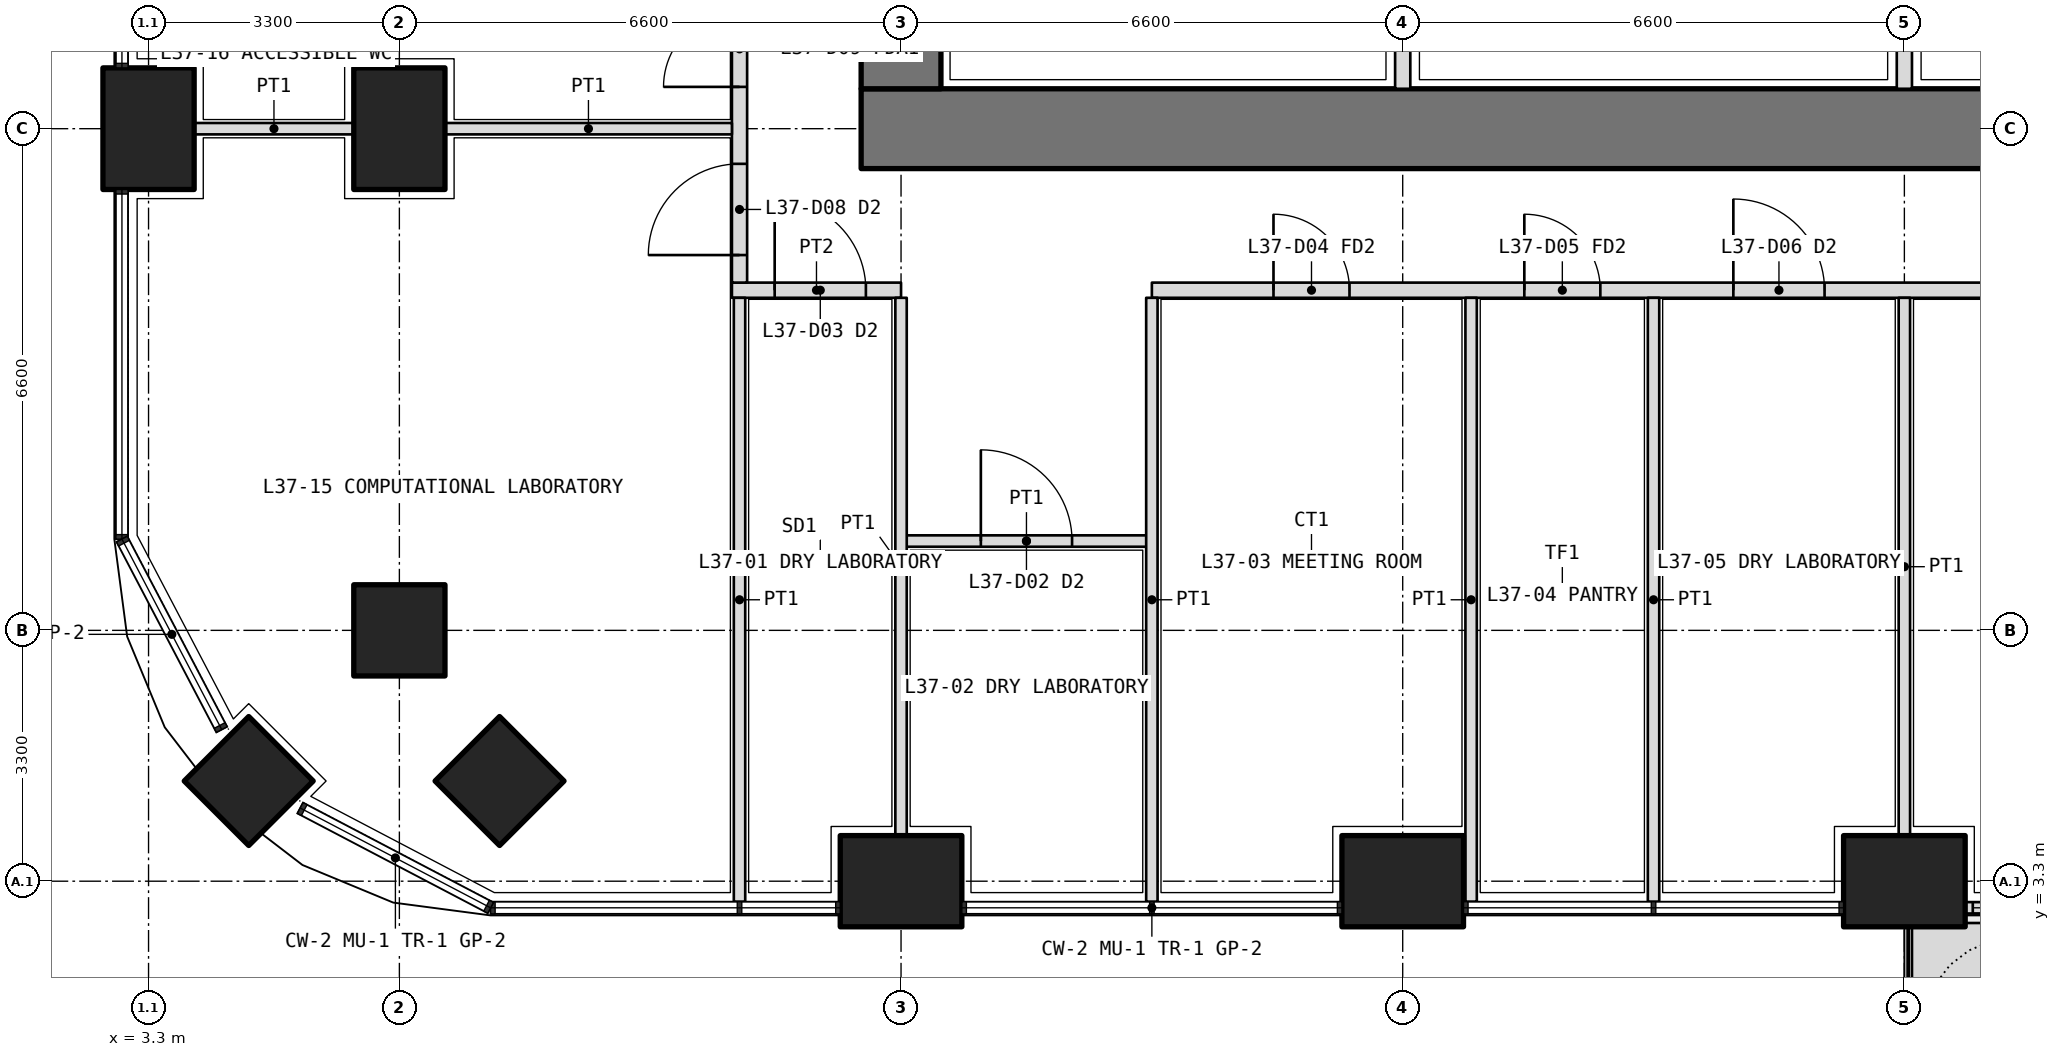
"""IFC4 building model, lengths in metres.
Left out: names, types, materials, properties, quantities, classifications, styles, units other than length and angle.
Written with IfcOpenShell. Run it as: python <this file> out.ifc"""

import sys

from ifc_helpers import new_model, si_unit, direction, frame, frame_2d, origin, origin_2d, place, context, subcontext, project, spatial, polyline, rectangle, outline, extrude, element, fill, save


model = new_model("IFC4")
c1 = context("Model", 3, precision=1e-05, world=origin(), true_north=direction((0.0, 1.0)))
c2 = subcontext(c1, "Body", "Model", "MODEL_VIEW")
j1 = project(units=[si_unit("LENGTHUNIT", "METRE"), si_unit("PLANEANGLEUNIT", "RADIAN")], contexts=[c1])
p1 = place(None, origin())
s1 = spatial("IfcSite", under=j1, at=p1, CompositionType="ELEMENT")
p2 = place(p1, origin())
s2 = spatial("IfcBuilding", under=s1, at=p2, CompositionType="ELEMENT")
p3 = place(p2, frame((0.0, 0.0, 164.1)))
s3 = spatial("IfcBuildingStorey", under=s2, at=p3, CompositionType="ELEMENT", Elevation=164.1)
p4 = place(p3, frame((4.618, 4.618, 0.0), z_axis=(0.0, 0.0, 1.0), x_axis=(0.707106781187, 0.707106781187, 0.0)))
e1 = element("IfcColumn", 1, at=p4, inside=s3, PredefinedType="COLUMN", context=c2, shape_type="SweptSolid", body=[
    extrude(rectangle(XDim=1.2, YDim=1.2, at=origin_2d()), origin(), (0.0, 0.0, 1.0), 4.2),
])
for number, where, z_axis, x_axis in (
    (2, (13.2, 3.3, 0.0), (0.0, 0.0, 1.0), (1.0, 0.0, 0.0)),
    (3, (19.8, 3.3, 0.0), (0.0, 0.0, 1.0), (1.0, 0.0, 0.0)),
    (4, (26.4, 3.3, 0.0), (0.0, 0.0, 1.0), (1.0, 0.0, 0.0)),
    (5, (3.3, 13.2, 0.0), (0.0, 0.0, 1.0), (0.0, 1.0, 0.0)),
):
    element("IfcColumn", number, at=place(p3, frame(where, z_axis=z_axis, x_axis=x_axis)), inside=s3, PredefinedType="COLUMN", context=c2, shape_type="SweptSolid", body=[
        extrude(rectangle(XDim=1.6, YDim=1.2, at=origin_2d()), origin(), (0.0, 0.0, 1.0), 4.2),
    ])
for number, where, z_axis, x_axis in (
    (6, (6.6, 6.6, 0.0), (0.0, 0.0, 1.0), (1.0, 0.0, 0.0)),
    (7, (7.918, 4.618, 0.0), (0.0, 0.0, 1.0), (0.707, 0.707, 0.0)),
):
    element("IfcColumn", number, at=place(p3, frame(where, z_axis=z_axis, x_axis=x_axis)), inside=s3, PredefinedType="COLUMN", context=c2, shape_type="SweptSolid", body=[
        extrude(rectangle(XDim=1.2, YDim=1.2, at=origin_2d()), origin(), (0.0, 0.0, 1.0), 4.2),
    ])
p5 = place(p3, frame((6.6, 13.2, 0.0), z_axis=(0.0, 0.0, 1.0), x_axis=(0.0, 1.0, 0.0)))
e8 = element("IfcColumn", 8, at=p5, inside=s3, PredefinedType="COLUMN", context=c2, shape_type="SweptSolid", body=[
    extrude(rectangle(XDim=1.6, YDim=1.2, at=origin_2d()), origin(), (0.0, 0.0, 1.0), 4.2),
])
p6 = place(p3, origin())
e9 = element("IfcWall", 9, at=p6, inside=s3, PredefinedType="USERDEFINED", context=c2, shape_type="SweptSolid", body=[
    extrude(outline(polyline([(26.5, 1.75), (28.95, 1.75), (28.95, 2.75), (26.5, 2.75), (26.5, 1.75)]), holes=[polyline([(26.65, 1.9), (28.8, 1.9), (28.8, 2.6), (26.65, 2.6), (26.65, 1.9)])]), origin(), (0.0, 0.0, 1.0), 1.05),
])
p7 = place(p3, frame((27.2, 2.95, 0.0), z_axis=(0.0, 0.0, 1.0), x_axis=(1.0, 0.0, 0.0)))
e10 = element("IfcWall", 10, at=p7, inside=s3, PredefinedType="SOLIDWALL", context=c2, shape_type="SweptSolid", body=[
    extrude(rectangle(XDim=5.0, YDim=0.15, at=frame_2d((2.5, 0.0))), origin(), (0.0, 0.0, 1.0), 2.7),
])
p8 = place(p7, frame((2.75, 0.0, 0.0)))
e11 = element("IfcOpeningElement", 11, at=p8, cuts=e10, PredefinedType="OPENING", context=c2, shape_type="SweptSolid", body=[
    extrude(rectangle(XDim=1.0, YDim=2.4, at=frame_2d((0.5, 1.2))), frame((0.0, 0.085, 0.0), z_axis=(0.0, -1.0, 0.0), x_axis=(1.0, 0.0, 0.0)), (0.0, 0.0, 1.0), 0.17),
])
p9 = place(p7, frame((0.1, 0.0, 0.1)))
e12 = element("IfcOpeningElement", 12, at=p9, cuts=e10, PredefinedType="OPENING", context=c2, shape_type="SweptSolid", body=[
    extrude(rectangle(XDim=2.15, YDim=2.3, at=frame_2d((1.075, 1.15))), frame((0.0, 0.085, 0.0), z_axis=(0.0, -1.0, 0.0), x_axis=(1.0, 0.0, 0.0)), (0.0, 0.0, 1.0), 0.17),
])
p10 = place(p7, frame((3.85, 0.0, 0.1)))
e13 = element("IfcOpeningElement", 13, at=p10, cuts=e10, PredefinedType="OPENING", context=c2, shape_type="SweptSolid", body=[
    extrude(rectangle(XDim=1.05, YDim=2.3, at=frame_2d((0.525, 1.15))), frame((0.0, 0.085, 0.0), z_axis=(0.0, -1.0, 0.0), x_axis=(1.0, 0.0, 0.0)), (0.0, 0.0, 1.0), 0.17),
])
p11 = place(p3, frame((12.675, 13.2, 0.0), z_axis=(0.0, 0.0, 1.0), x_axis=(1.0, 0.0, 0.0)))
e14 = element("IfcWall", 14, at=p11, inside=s3, PredefinedType="SHEAR", context=c2, shape_type="SweptSolid", body=[
    extrude(rectangle(XDim=27.45, YDim=1.05, at=frame_2d((13.725, 0.0))), origin(), (0.0, 0.0, 1.0), 4.2),
])
p12 = place(p3, frame((13.2, 32.475, 0.0), z_axis=(0.0, 0.0, 1.0), x_axis=(0.0, -1.0, 0.0)))
e15 = element("IfcWall", 15, at=p12, inside=s3, PredefinedType="SHEAR", context=c2, shape_type="SweptSolid", body=[
    extrude(rectangle(XDim=18.75, YDim=1.05, at=frame_2d((9.375, 0.0))), origin(), (0.0, 0.0, 1.0), 4.2),
])
p13 = place(p12, frame((14.125, 0.0, 0.0)))
e16 = element("IfcOpeningElement", 16, at=p13, cuts=e15, PredefinedType="OPENING", context=c2, shape_type="SweptSolid", body=[
    extrude(rectangle(XDim=1.6, YDim=2.1, at=frame_2d((0.8, 1.05))), frame((0.0, 0.535, 0.0), z_axis=(0.0, -1.0, 0.0), x_axis=(1.0, 0.0, 0.0)), (0.0, 0.0, 1.0), 1.07),
])
p14 = place(p12, frame((3.325, 0.0, 0.0)))
e17 = element("IfcOpeningElement", 17, at=p14, cuts=e15, PredefinedType="OPENING", context=c2, shape_type="SweptSolid", body=[
    extrude(rectangle(XDim=1.6, YDim=2.1, at=frame_2d((0.8, 1.05))), frame((0.0, 0.535, 0.0), z_axis=(0.0, -1.0, 0.0), x_axis=(1.0, 0.0, 0.0)), (0.0, 0.0, 1.0), 1.07),
])
for number, where, z_axis, x_axis in (
    (18, (19.8, 13.725, 0.0), (0.0, 0.0, 1.0), (0.0, 1.0, 0.0)),
    (19, (26.4, 13.725, 0.0), (0.0, 0.0, 1.0), (0.0, 1.0, 0.0)),
):
    element("IfcWall", number, at=place(p3, frame(where, z_axis=z_axis, x_axis=x_axis)), inside=s3, PredefinedType="PARTITIONING", context=c2, shape_type="SweptSolid", body=[
        extrude(rectangle(XDim=1.975, YDim=0.2, at=frame_2d((0.987, 0.0))), origin(), (0.0, 0.0, 1.0), 4.2),
    ])
p15 = place(p3, frame((10.975, 11.075, 0.0), z_axis=(0.0, 0.0, 1.0), x_axis=(1.0, 0.0, 0.0)))
e20 = element("IfcWall", 20, at=p15, inside=s3, PredefinedType="PARTITIONING", context=c2, shape_type="SweptSolid", body=[
    extrude(rectangle(XDim=2.225, YDim=0.2, at=frame_2d((1.112, 0.0))), origin(), (0.0, 0.0, 1.0), 2.85),
])
p16 = place(p15, frame((0.562, 0.0, 0.0)))
e21 = element("IfcOpeningElement", 21, at=p16, cuts=e20, PredefinedType="OPENING", context=c2, shape_type="SweptSolid", body=[
    extrude(rectangle(XDim=1.2, YDim=2.1, at=frame_2d((0.6, 1.05))), frame((0.0, 0.11, 0.0), z_axis=(0.0, -1.0, 0.0), x_axis=(1.0, 0.0, 0.0)), (0.0, 0.0, 1.0), 0.22),
])
p17 = place(p3, frame((16.5, 11.075, 0.0), z_axis=(0.0, 0.0, 1.0), x_axis=(1.0, 0.0, 0.0)))
e22 = element("IfcWall", 22, at=p17, inside=s3, PredefinedType="PARTITIONING", context=c2, shape_type="SweptSolid", body=[
    extrude(rectangle(XDim=25.325, YDim=0.2, at=frame_2d((12.663, 0.0))), origin(), (0.0, 0.0, 1.0), 2.85),
])
p18 = place(p17, frame((1.6, 0.0, 0.0)))
e23 = element("IfcOpeningElement", 23, at=p18, cuts=e22, PredefinedType="OPENING", context=c2, shape_type="SweptSolid", body=[
    extrude(rectangle(XDim=1.0, YDim=2.1, at=frame_2d((0.5, 1.05))), frame((0.0, 0.11, 0.0), z_axis=(0.0, -1.0, 0.0), x_axis=(1.0, 0.0, 0.0)), (0.0, 0.0, 1.0), 0.22),
])
p19 = place(p17, frame((4.9, 0.0, 0.0)))
e24 = element("IfcOpeningElement", 24, at=p19, cuts=e22, PredefinedType="OPENING", context=c2, shape_type="SweptSolid", body=[
    extrude(rectangle(XDim=1.0, YDim=2.1, at=frame_2d((0.5, 1.05))), frame((0.0, 0.11, 0.0), z_axis=(0.0, -1.0, 0.0), x_axis=(1.0, 0.0, 0.0)), (0.0, 0.0, 1.0), 0.22),
])
p20 = place(p17, frame((7.65, 0.0, 0.0)))
e25 = element("IfcOpeningElement", 25, at=p20, cuts=e22, PredefinedType="OPENING", context=c2, shape_type="SweptSolid", body=[
    extrude(rectangle(XDim=1.2, YDim=2.1, at=frame_2d((0.6, 1.05))), frame((0.0, 0.11, 0.0), z_axis=(0.0, -1.0, 0.0), x_axis=(1.0, 0.0, 0.0)), (0.0, 0.0, 1.0), 0.22),
])
p21 = place(p17, frame((16.962, 0.0, 0.0)))
e26 = element("IfcOpeningElement", 26, at=p21, cuts=e22, PredefinedType="OPENING", context=c2, shape_type="SweptSolid", body=[
    extrude(rectangle(XDim=1.2, YDim=2.1, at=frame_2d((0.6, 1.05))), frame((0.0, 0.11, 0.0), z_axis=(0.0, -1.0, 0.0), x_axis=(1.0, 0.0, 0.0)), (0.0, 0.0, 1.0), 0.22),
])
p22 = place(p3, frame((11.075, 11.175, 0.0), z_axis=(0.0, 0.0, 1.0), x_axis=(0.0, 1.0, 0.0)))
e27 = element("IfcWall", 27, at=p22, inside=s3, PredefinedType="PARTITIONING", context=c2, shape_type="SweptSolid", body=[
    extrude(rectangle(XDim=23.85, YDim=0.2, at=frame_2d((11.925, 0.0))), origin(), (0.0, 0.0, 1.0), 2.85),
])
p23 = place(p22, frame((0.363, 0.0, 0.0)))
e28 = element("IfcOpeningElement", 28, at=p23, cuts=e27, PredefinedType="OPENING", context=c2, shape_type="SweptSolid", body=[
    extrude(rectangle(XDim=1.2, YDim=2.1, at=frame_2d((0.6, 1.05))), frame((0.0, 0.11, 0.0), z_axis=(0.0, -1.0, 0.0), x_axis=(1.0, 0.0, 0.0)), (0.0, 0.0, 1.0), 0.22),
])
p24 = place(p22, frame((2.575, 0.0, 0.0)))
e29 = element("IfcOpeningElement", 29, at=p24, cuts=e27, PredefinedType="OPENING", context=c2, shape_type="SweptSolid", body=[
    extrude(rectangle(XDim=1.0, YDim=2.1, at=frame_2d((0.5, 1.05))), frame((0.0, 0.11, 0.0), z_axis=(0.0, -1.0, 0.0), x_axis=(1.0, 0.0, 0.0)), (0.0, 0.0, 1.0), 0.22),
])
p25 = place(p22, frame((5.625, 0.0, 0.0)))
e30 = element("IfcOpeningElement", 30, at=p25, cuts=e27, PredefinedType="OPENING", context=c2, shape_type="SweptSolid", body=[
    extrude(rectangle(XDim=0.9, YDim=2.1, at=frame_2d((0.45, 1.05))), frame((0.0, 0.11, 0.0), z_axis=(0.0, -1.0, 0.0), x_axis=(1.0, 0.0, 0.0)), (0.0, 0.0, 1.0), 0.22),
])
p26 = place(p22, frame((9.425, 0.0, 0.0)))
e31 = element("IfcOpeningElement", 31, at=p26, cuts=e27, PredefinedType="OPENING", context=c2, shape_type="SweptSolid", body=[
    extrude(rectangle(XDim=0.9, YDim=2.1, at=frame_2d((0.45, 1.05))), frame((0.0, 0.11, 0.0), z_axis=(0.0, -1.0, 0.0), x_axis=(1.0, 0.0, 0.0)), (0.0, 0.0, 1.0), 0.22),
])
p27 = place(p22, frame((12.975, 0.0, 0.0)))
e32 = element("IfcOpeningElement", 32, at=p27, cuts=e27, PredefinedType="OPENING", context=c2, shape_type="SweptSolid", body=[
    extrude(rectangle(XDim=1.0, YDim=2.1, at=frame_2d((0.5, 1.05))), frame((0.0, 0.11, 0.0), z_axis=(0.0, -1.0, 0.0), x_axis=(1.0, 0.0, 0.0)), (0.0, 0.0, 1.0), 0.22),
])
p28 = place(p22, frame((16.375, 0.0, 0.0)))
e33 = element("IfcOpeningElement", 33, at=p28, cuts=e27, PredefinedType="OPENING", context=c2, shape_type="SweptSolid", body=[
    extrude(rectangle(XDim=1.0, YDim=2.1, at=frame_2d((0.5, 1.05))), frame((0.0, 0.11, 0.0), z_axis=(0.0, -1.0, 0.0), x_axis=(1.0, 0.0, 0.0)), (0.0, 0.0, 1.0), 0.22),
])
p29 = place(p22, frame((20.637, 0.0, 0.0)))
e34 = element("IfcOpeningElement", 34, at=p29, cuts=e27, PredefinedType="OPENING", context=c2, shape_type="SweptSolid", body=[
    extrude(rectangle(XDim=1.2, YDim=2.1, at=frame_2d((0.6, 1.05))), frame((0.0, 0.11, 0.0), z_axis=(0.0, -1.0, 0.0), x_axis=(1.0, 0.0, 0.0)), (0.0, 0.0, 1.0), 0.22),
])
p30 = place(p3, frame((11.075, 3.03, 0.0), z_axis=(0.0, 0.0, 1.0), x_axis=(0.0, 1.0, 0.0)))
e35 = element("IfcWall", 35, at=p30, inside=s3, PredefinedType="PARTITIONING", context=c2, shape_type="SweptSolid", body=[
    extrude(rectangle(XDim=7.945, YDim=0.15, at=frame_2d((3.973, 0.0))), origin(), (0.0, 0.0, 1.0), 2.7),
])
p31 = place(p3, frame((13.2, 7.775, 0.0), z_axis=(0.0, 0.0, 1.0), x_axis=(1.0, 0.0, 0.0)))
e36 = element("IfcWall", 36, at=p31, inside=s3, PredefinedType="PARTITIONING", context=c2, shape_type="SweptSolid", body=[
    extrude(rectangle(XDim=3.3, YDim=0.15, at=frame_2d((1.65, 0.0))), origin(), (0.0, 0.0, 1.0), 2.85),
])
p32 = place(p31, frame((1.05, 0.0, 0.0)))
e37 = element("IfcOpeningElement", 37, at=p32, cuts=e36, PredefinedType="OPENING", context=c2, shape_type="SweptSolid", body=[
    extrude(rectangle(XDim=1.2, YDim=2.1, at=frame_2d((0.6, 1.05))), frame((0.0, 0.085, 0.0), z_axis=(0.0, -1.0, 0.0), x_axis=(1.0, 0.0, 0.0)), (0.0, 0.0, 1.0), 0.17),
])
for number, where, z_axis, x_axis in (
    (38, (20.7, 3.03, 0.0), (0.0, 0.0, 1.0), (0.0, 1.0, 0.0)),
    (39, (23.1, 3.03, 0.0), (0.0, 0.0, 1.0), (0.0, 1.0, 0.0)),
):
    element("IfcWall", number, at=place(p3, frame(where, z_axis=z_axis, x_axis=x_axis)), inside=s3, PredefinedType="PARTITIONING", context=c2, shape_type="SweptSolid", body=[
        extrude(rectangle(XDim=7.945, YDim=0.15, at=frame_2d((3.973, 0.0))), origin(), (0.0, 0.0, 1.0), 2.7),
    ])
p33 = place(p3, frame((13.2, 3.9, 0.0), z_axis=(0.0, 0.0, 1.0), x_axis=(0.0, 1.0, 0.0)))
e40 = element("IfcWall", 40, at=p33, inside=s3, PredefinedType="PARTITIONING", context=c2, shape_type="SweptSolid", body=[
    extrude(rectangle(XDim=7.075, YDim=0.15, at=frame_2d((3.538, 0.0))), origin(), (0.0, 0.0, 1.0), 2.85),
])
p34 = place(p3, frame((16.5, 3.03, 0.0), z_axis=(0.0, 0.0, 1.0), x_axis=(0.0, 1.0, 0.0)))
e41 = element("IfcWall", 41, at=p34, inside=s3, PredefinedType="PARTITIONING", context=c2, shape_type="SweptSolid", body=[
    extrude(rectangle(XDim=7.945, YDim=0.15, at=frame_2d((3.973, 0.0))), origin(), (0.0, 0.0, 1.0), 2.7),
])
p35 = place(p3, frame((26.4, 3.9, 0.0), z_axis=(0.0, 0.0, 1.0), x_axis=(0.0, 1.0, 0.0)))
e42 = element("IfcWall", 42, at=p35, inside=s3, PredefinedType="PARTITIONING", context=c2, shape_type="SweptSolid", body=[
    extrude(rectangle(XDim=7.075, YDim=0.15, at=frame_2d((3.538, 0.0))), origin(), (0.0, 0.0, 1.0), 2.85),
])
p36 = place(p3, frame((3.9, 13.2, 0.0), z_axis=(0.0, 0.0, 1.0), x_axis=(1.0, 0.0, 0.0)))
e43 = element("IfcWall", 43, at=p36, inside=s3, PredefinedType="PARTITIONING", context=c2, shape_type="SweptSolid", body=[
    extrude(rectangle(XDim=2.1, YDim=0.15, at=frame_2d((1.05, 0.0))), origin(), (0.0, 0.0, 1.0), 2.85),
])
p37 = place(p3, frame((7.2, 13.2, 0.0), z_axis=(0.0, 0.0, 1.0), x_axis=(1.0, 0.0, 0.0)))
e44 = element("IfcWall", 44, at=p37, inside=s3, PredefinedType="PARTITIONING", context=c2, shape_type="SweptSolid", body=[
    extrude(rectangle(XDim=3.775, YDim=0.15, at=frame_2d((1.888, 0.0))), origin(), (0.0, 0.0, 1.0), 2.85),
])
p38 = place(p9, origin())
e45 = element("IfcWindow", 45, at=p38, inside=s3, PartitioningType="SINGLE_PANEL", PredefinedType="WINDOW", context=c2, shape_type="SweptSolid", body=[
    extrude(rectangle(XDim=2.15, YDim=2.3, at=frame_2d((1.075, 1.15))), frame((0.0, 0.03, 0.0), z_axis=(0.0, -1.0, 0.0), x_axis=(1.0, 0.0, 0.0)), (0.0, 0.0, 1.0), 0.06),
])
fill(e12, e45)
p39 = place(p16, origin())
e46 = element("IfcDoor", 46, at=p39, inside=s3, OperationType="DOUBLE_DOOR_SINGLE_SWING", PredefinedType="DOOR", context=c2, shape_type="SweptSolid", body=[
    extrude(rectangle(XDim=1.2, YDim=2.1, at=frame_2d((0.6, 1.05))), frame((0.0, 0.025, 0.0), z_axis=(0.0, -1.0, 0.0), x_axis=(1.0, 0.0, 0.0)), (0.0, 0.0, 1.0), 0.05),
])
fill(e21, e46)
p40 = place(p32, origin())
e47 = element("IfcDoor", 47, at=p40, inside=s3, OperationType="DOUBLE_DOOR_SINGLE_SWING", PredefinedType="DOOR", context=c2, shape_type="SweptSolid", body=[
    extrude(rectangle(XDim=1.2, YDim=2.1, at=frame_2d((0.6, 1.05))), frame((0.0, 0.025, 0.0), z_axis=(0.0, -1.0, 0.0), x_axis=(1.0, 0.0, 0.0)), (0.0, 0.0, 1.0), 0.05),
])
fill(e37, e47)
p41 = place(p18, origin())
e48 = element("IfcDoor", 48, at=p41, inside=s3, OperationType="SINGLE_SWING_LEFT", PredefinedType="DOOR", context=c2, shape_type="SweptSolid", body=[
    extrude(rectangle(XDim=1.0, YDim=2.1, at=frame_2d((0.5, 1.05))), frame((0.0, 0.025, 0.0), z_axis=(0.0, -1.0, 0.0), x_axis=(1.0, 0.0, 0.0)), (0.0, 0.0, 1.0), 0.05),
])
fill(e23, e48)
p42 = place(p19, origin())
e49 = element("IfcDoor", 49, at=p42, inside=s3, OperationType="SINGLE_SWING_LEFT", PredefinedType="DOOR", context=c2, shape_type="SweptSolid", body=[
    extrude(rectangle(XDim=1.0, YDim=2.1, at=frame_2d((0.5, 1.05))), frame((0.0, 0.025, 0.0), z_axis=(0.0, -1.0, 0.0), x_axis=(1.0, 0.0, 0.0)), (0.0, 0.0, 1.0), 0.05),
])
fill(e24, e49)
p43 = place(p20, origin())
e50 = element("IfcDoor", 50, at=p43, inside=s3, OperationType="DOUBLE_DOOR_SINGLE_SWING", PredefinedType="DOOR", context=c2, shape_type="SweptSolid", body=[
    extrude(rectangle(XDim=1.2, YDim=2.1, at=frame_2d((0.6, 1.05))), frame((0.0, 0.025, 0.0), z_axis=(0.0, -1.0, 0.0), x_axis=(1.0, 0.0, 0.0)), (0.0, 0.0, 1.0), 0.05),
])
fill(e25, e50)
p44 = place(p23, origin())
e51 = element("IfcDoor", 51, at=p44, inside=s3, OperationType="DOUBLE_DOOR_SINGLE_SWING", PredefinedType="DOOR", context=c2, shape_type="SweptSolid", body=[
    extrude(rectangle(XDim=1.2, YDim=2.1, at=frame_2d((0.6, 1.05))), frame((0.0, 0.025, 0.0), z_axis=(0.0, -1.0, 0.0), x_axis=(1.0, 0.0, 0.0)), (0.0, 0.0, 1.0), 0.05),
])
fill(e28, e51)
p45 = place(p24, origin())
e52 = element("IfcDoor", 52, at=p45, inside=s3, OperationType="SINGLE_SWING_LEFT", PredefinedType="DOOR", context=c2, shape_type="SweptSolid", body=[
    extrude(rectangle(XDim=1.0, YDim=2.1, at=frame_2d((0.5, 1.05))), frame((0.0, 0.025, 0.0), z_axis=(0.0, -1.0, 0.0), x_axis=(1.0, 0.0, 0.0)), (0.0, 0.0, 1.0), 0.05),
])
fill(e29, e52)
save(model, sys.argv[1])
